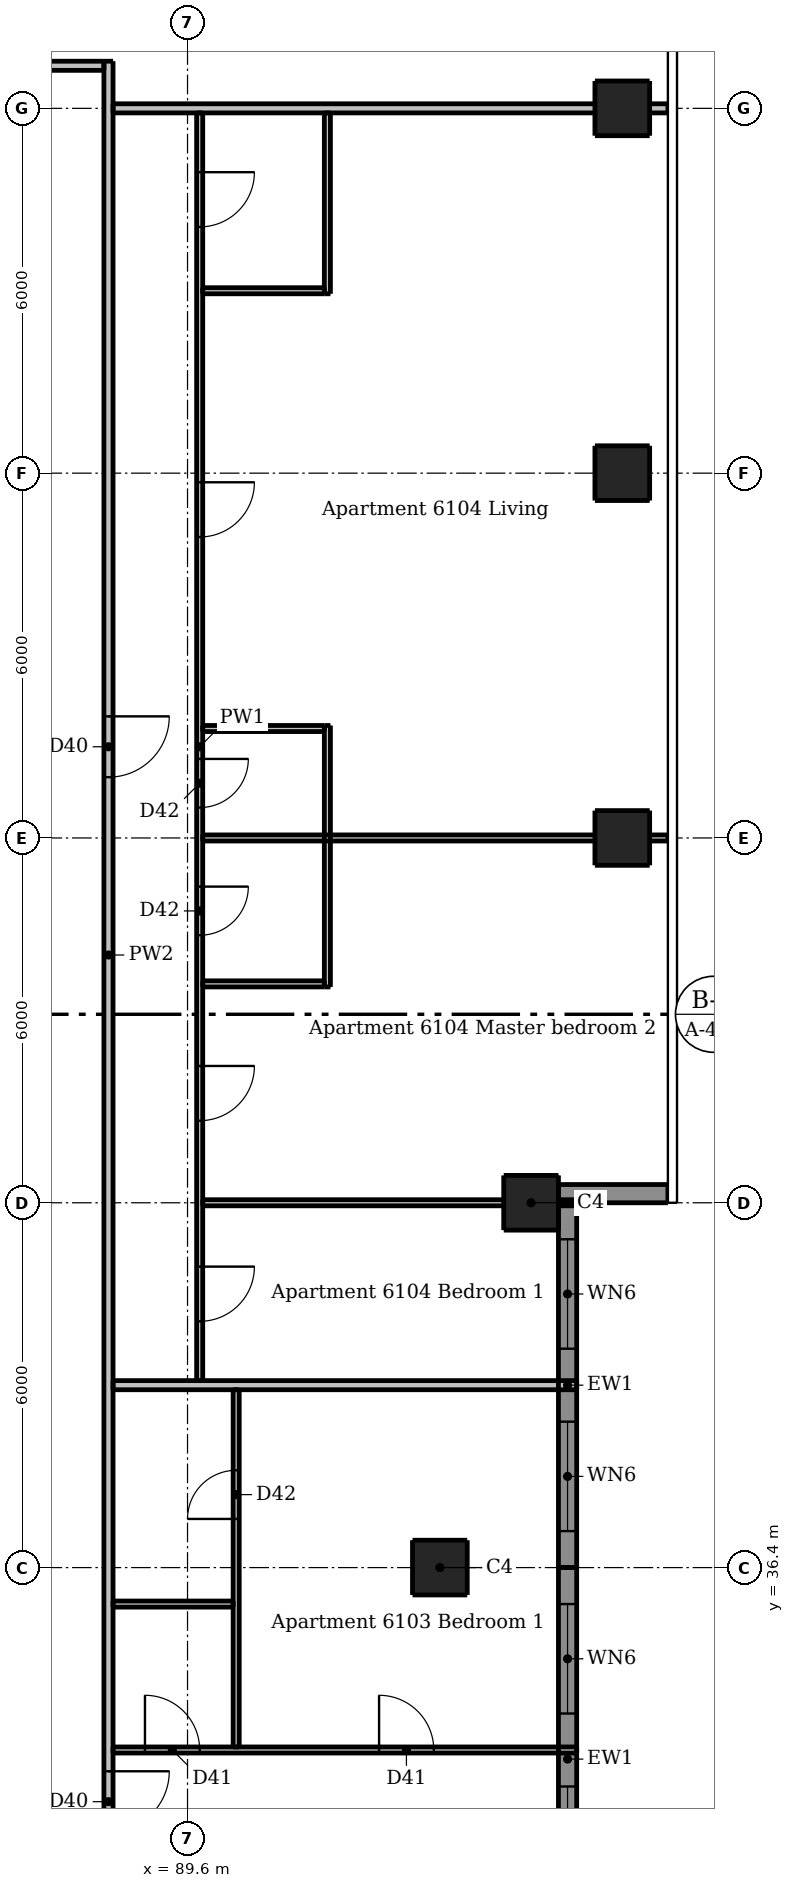
"""IFC4 building model, lengths in metres.
Left out: names, types, materials, properties, quantities, classifications, styles, units other than length and angle.
Written with IfcOpenShell. Run it as: python <this file> out.ifc"""

import sys

from ifc_helpers import new_model, si_unit, direction, frame, frame_2d, origin, origin_2d, place, context, subcontext, project, spatial, rectangle, extrude, element, fill, save


model = new_model("IFC4")
c1 = context("Model", 3, precision=1e-05, world=origin(), true_north=direction((0.0, 1.0)))
c2 = subcontext(c1, "Body", "Model", "MODEL_VIEW")
j1 = project(units=[si_unit("LENGTHUNIT", "METRE"), si_unit("PLANEANGLEUNIT", "RADIAN")], contexts=[c1])
p1 = place(None, origin())
s1 = spatial("IfcSite", under=j1, at=p1, CompositionType="ELEMENT")
p2 = place(p1, origin())
s2 = spatial("IfcBuilding", under=s1, at=p2, CompositionType="ELEMENT")
p3 = place(p2, frame((0.0, 0.0, 226.6)))
s3 = spatial("IfcBuildingStorey", under=s2, at=p3, CompositionType="ELEMENT", Elevation=226.6)
for number, where, z_axis, x_axis in (
    (1, (93.75, 36.4, 0.0), (0.0, 0.0, 1.0), (1.0, 0.0, 0.0)),
    (2, (95.25, 42.4, 0.0), (0.0, 0.0, 1.0), (1.0, 0.0, 0.0)),
    (3, (96.75, 48.4, 0.0), (0.0, 0.0, 1.0), (1.0, 0.0, 0.0)),
    (4, (96.75, 54.4, 0.0), (0.0, 0.0, 1.0), (1.0, 0.0, 0.0)),
    (5, (96.75, 60.4, 0.0), (0.0, 0.0, 1.0), (1.0, 0.0, 0.0)),
):
    element("IfcColumn", number, at=place(p3, frame(where, z_axis=z_axis, x_axis=x_axis)), inside=s3, PredefinedType="COLUMN", context=c2, shape_type="SweptSolid", body=[
        extrude(rectangle(XDim=0.9, YDim=0.9, at=origin_2d()), origin(), (0.0, 0.0, 1.0), 2.95),
    ])
p4 = place(p3, frame((95.7, 42.55, 0.0), z_axis=(0.0, 0.0, 1.0), x_axis=(1.0, 0.0, 0.0)))
e6 = element("IfcWall", 6, at=p4, inside=s3, PredefinedType="SOLIDWALL", context=c2, shape_type="SweptSolid", body=[
    extrude(rectangle(XDim=1.8, YDim=0.3, at=frame_2d((0.9, 0.0))), origin(), (0.0, 0.0, 1.0), 2.95),
])
p5 = place(p3, frame((95.85, 30.1, 0.0), z_axis=(0.0, 0.0, 1.0), x_axis=(0.0, 1.0, 0.0)))
e7 = element("IfcWall", 7, at=p5, inside=s3, PredefinedType="SOLIDWALL", context=c2, shape_type="SweptSolid", body=[
    extrude(rectangle(XDim=6.3, YDim=0.3, at=frame_2d((3.15, 0.0))), origin(), (0.0, 0.0, 1.0), 2.34),
])
p6 = place(p5, frame((0.9, 0.0, 0.15)))
e8 = element("IfcOpeningElement", 8, at=p6, cuts=e7, PredefinedType="OPENING", context=c2, shape_type="SweptSolid", body=[
    extrude(rectangle(XDim=1.8, YDim=2.1, at=frame_2d((0.9, 1.05))), frame((0.0, 0.16, 0.0), z_axis=(0.0, -1.0, 0.0), x_axis=(1.0, 0.0, 0.0)), (0.0, 0.0, 1.0), 0.32),
])
p7 = place(p5, frame((3.9, 0.0, 0.15)))
e9 = element("IfcOpeningElement", 9, at=p7, cuts=e7, PredefinedType="OPENING", context=c2, shape_type="SweptSolid", body=[
    extrude(rectangle(XDim=1.8, YDim=2.1, at=frame_2d((0.9, 1.05))), frame((0.0, 0.16, 0.0), z_axis=(0.0, -1.0, 0.0), x_axis=(1.0, 0.0, 0.0)), (0.0, 0.0, 1.0), 0.32),
])
p8 = place(p3, frame((95.85, 36.4, 0.0), z_axis=(0.0, 0.0, 1.0), x_axis=(0.0, 1.0, 0.0)))
e10 = element("IfcWall", 10, at=p8, inside=s3, PredefinedType="SOLIDWALL", context=c2, shape_type="SweptSolid", body=[
    extrude(rectangle(XDim=6.0, YDim=0.3, at=frame_2d((3.0, 0.0))), origin(), (0.0, 0.0, 1.0), 2.34),
])
p9 = place(p8, frame((0.6, 0.0, 0.15)))
e11 = element("IfcOpeningElement", 11, at=p9, cuts=e10, PredefinedType="OPENING", context=c2, shape_type="SweptSolid", body=[
    extrude(rectangle(XDim=1.8, YDim=2.1, at=frame_2d((0.9, 1.05))), frame((0.0, 0.16, 0.0), z_axis=(0.0, -1.0, 0.0), x_axis=(1.0, 0.0, 0.0)), (0.0, 0.0, 1.0), 0.32),
])
p10 = place(p8, frame((3.6, 0.0, 0.15)))
e12 = element("IfcOpeningElement", 12, at=p10, cuts=e10, PredefinedType="OPENING", context=c2, shape_type="SweptSolid", body=[
    extrude(rectangle(XDim=1.8, YDim=2.1, at=frame_2d((0.9, 1.05))), frame((0.0, 0.16, 0.0), z_axis=(0.0, -1.0, 0.0), x_axis=(1.0, 0.0, 0.0)), (0.0, 0.0, 1.0), 0.32),
])
p11 = place(p3, frame((89.8, 60.325, 0.0), z_axis=(0.0, 0.0, 1.0), x_axis=(0.0, -1.0, 0.0)))
e13 = element("IfcWall", 13, at=p11, inside=s3, PredefinedType="PARTITIONING", context=c2, shape_type="SweptSolid", body=[
    extrude(rectangle(XDim=20.85, YDim=0.1, at=frame_2d((10.425, 0.0))), origin(), (0.0, 0.0, 1.0), 2.95),
])
p12 = place(p11, frame((6.075, 0.0, 0.0)))
e14 = element("IfcOpeningElement", 14, at=p12, cuts=e13, PredefinedType="OPENING", context=c2, shape_type="SweptSolid", body=[
    extrude(rectangle(XDim=0.9, YDim=2.1, at=frame_2d((0.45, 1.05))), frame((0.0, 0.06, 0.0), z_axis=(0.0, -1.0, 0.0), x_axis=(1.0, 0.0, 0.0)), (0.0, 0.0, 1.0), 0.12),
])
p13 = place(p11, frame((0.975, 0.0, 0.0)))
e15 = element("IfcOpeningElement", 15, at=p13, cuts=e13, PredefinedType="OPENING", context=c2, shape_type="SweptSolid", body=[
    extrude(rectangle(XDim=0.9, YDim=2.1, at=frame_2d((0.45, 1.05))), frame((0.0, 0.06, 0.0), z_axis=(0.0, -1.0, 0.0), x_axis=(1.0, 0.0, 0.0)), (0.0, 0.0, 1.0), 0.12),
])
p14 = place(p11, frame((10.625, 0.0, 0.0)))
e16 = element("IfcOpeningElement", 16, at=p14, cuts=e13, PredefinedType="OPENING", context=c2, shape_type="SweptSolid", body=[
    extrude(rectangle(XDim=0.8, YDim=2.1, at=frame_2d((0.4, 1.05))), frame((0.0, 0.06, 0.0), z_axis=(0.0, -1.0, 0.0), x_axis=(1.0, 0.0, 0.0)), (0.0, 0.0, 1.0), 0.12),
])
p15 = place(p11, frame((18.975, 0.0, 0.0)))
e17 = element("IfcOpeningElement", 17, at=p15, cuts=e13, PredefinedType="OPENING", context=c2, shape_type="SweptSolid", body=[
    extrude(rectangle(XDim=0.9, YDim=2.1, at=frame_2d((0.45, 1.05))), frame((0.0, 0.06, 0.0), z_axis=(0.0, -1.0, 0.0), x_axis=(1.0, 0.0, 0.0)), (0.0, 0.0, 1.0), 0.12),
])
p16 = place(p11, frame((15.675, 0.0, 0.0)))
e18 = element("IfcOpeningElement", 18, at=p16, cuts=e13, PredefinedType="OPENING", context=c2, shape_type="SweptSolid", body=[
    extrude(rectangle(XDim=0.9, YDim=2.1, at=frame_2d((0.45, 1.05))), frame((0.0, 0.06, 0.0), z_axis=(0.0, -1.0, 0.0), x_axis=(1.0, 0.0, 0.0)), (0.0, 0.0, 1.0), 0.12),
])
p17 = place(p11, frame((12.725, 0.0, 0.0)))
e19 = element("IfcOpeningElement", 19, at=p17, cuts=e13, PredefinedType="OPENING", context=c2, shape_type="SweptSolid", body=[
    extrude(rectangle(XDim=0.8, YDim=2.1, at=frame_2d((0.4, 1.05))), frame((0.0, 0.06, 0.0), z_axis=(0.0, -1.0, 0.0), x_axis=(1.0, 0.0, 0.0)), (0.0, 0.0, 1.0), 0.12),
])
p18 = place(p3, frame((90.4, 33.45, 0.0), z_axis=(0.0, 0.0, 1.0), x_axis=(0.0, 1.0, 0.0)))
e20 = element("IfcWall", 20, at=p18, inside=s3, PredefinedType="PARTITIONING", context=c2, shape_type="SweptSolid", body=[
    extrude(rectangle(XDim=5.875, YDim=0.1, at=frame_2d((2.938, 0.0))), origin(), (0.0, 0.0, 1.0), 2.95),
])
p19 = place(p18, frame((3.75, 0.0, 0.0)))
e21 = element("IfcOpeningElement", 21, at=p19, cuts=e20, PredefinedType="OPENING", context=c2, shape_type="SweptSolid", body=[
    extrude(rectangle(XDim=0.8, YDim=2.1, at=frame_2d((0.4, 1.05))), frame((0.0, 0.06, 0.0), z_axis=(0.0, -1.0, 0.0), x_axis=(1.0, 0.0, 0.0)), (0.0, 0.0, 1.0), 0.12),
])
p20 = place(p3, frame((91.9, 45.95, 0.0), z_axis=(0.0, 0.0, 1.0), x_axis=(0.0, 1.0, 0.0)))
e22 = element("IfcWall", 22, at=p20, inside=s3, PredefinedType="PARTITIONING", context=c2, shape_type="SweptSolid", body=[
    extrude(rectangle(XDim=4.3, YDim=0.1, at=frame_2d((2.15, 0.0))), origin(), (0.0, 0.0, 1.0), 2.95),
])
p21 = place(p3, frame((91.9, 57.35, 0.0), z_axis=(0.0, 0.0, 1.0), x_axis=(0.0, 1.0, 0.0)))
e23 = element("IfcWall", 23, at=p21, inside=s3, PredefinedType="PARTITIONING", context=c2, shape_type="SweptSolid", body=[
    extrude(rectangle(XDim=2.975, YDim=0.1, at=frame_2d((1.487, 0.0))), origin(), (0.0, 0.0, 1.0), 2.95),
])
for number, where, z_axis, x_axis in (
    (24, (89.85, 57.4, 0.0), (0.0, 0.0, 1.0), (1.0, 0.0, 0.0)),
    (25, (89.85, 50.2, 0.0), (0.0, 0.0, 1.0), (1.0, 0.0, 0.0)),
):
    element("IfcWall", number, at=place(p3, frame(where, z_axis=z_axis, x_axis=x_axis)), inside=s3, PredefinedType="PARTITIONING", context=c2, shape_type="SweptSolid", body=[
        extrude(rectangle(XDim=2.0, YDim=0.1, at=frame_2d((1.0, 0.0))), origin(), (0.0, 0.0, 1.0), 2.95),
    ])
p22 = place(p3, frame((89.85, 48.4, 0.0), z_axis=(0.0, 0.0, 1.0), x_axis=(1.0, 0.0, 0.0)))
e26 = element("IfcWall", 26, at=p22, inside=s3, PredefinedType="PARTITIONING", context=c2, shape_type="SweptSolid", body=[
    extrude(rectangle(XDim=7.65, YDim=0.1, at=frame_2d((3.825, 0.0))), origin(), (0.0, 0.0, 1.0), 2.332),
])
p23 = place(p3, frame((89.85, 46.0, 0.0), z_axis=(0.0, 0.0, 1.0), x_axis=(1.0, 0.0, 0.0)))
e27 = element("IfcWall", 27, at=p23, inside=s3, PredefinedType="PARTITIONING", context=c2, shape_type="SweptSolid", body=[
    extrude(rectangle(XDim=2.0, YDim=0.1, at=frame_2d((1.0, 0.0))), origin(), (0.0, 0.0, 1.0), 2.95),
])
p24 = place(p3, frame((89.85, 42.4, 0.0), z_axis=(0.0, 0.0, 1.0), x_axis=(1.0, 0.0, 0.0)))
e28 = element("IfcWall", 28, at=p24, inside=s3, PredefinedType="PARTITIONING", context=c2, shape_type="SweptSolid", body=[
    extrude(rectangle(XDim=6.15, YDim=0.1, at=frame_2d((3.075, 0.0))), origin(), (0.0, 0.0, 1.0), 2.332),
])
p25 = place(p3, frame((88.375, 35.8, 0.0), z_axis=(0.0, 0.0, 1.0), x_axis=(1.0, 0.0, 0.0)))
e29 = element("IfcWall", 29, at=p25, inside=s3, PredefinedType="PARTITIONING", context=c2, shape_type="SweptSolid", body=[
    extrude(rectangle(XDim=1.975, YDim=0.1, at=frame_2d((0.988, 0.0))), origin(), (0.0, 0.0, 1.0), 2.95),
])
p26 = place(p3, frame((88.375, 33.4, 0.0), z_axis=(0.0, 0.0, 1.0), x_axis=(1.0, 0.0, 0.0)))
e30 = element("IfcWall", 30, at=p26, inside=s3, PredefinedType="PARTITIONING", context=c2, shape_type="SweptSolid", body=[
    extrude(rectangle(XDim=7.625, YDim=0.1, at=frame_2d((3.812, 0.0))), origin(), (0.0, 0.0, 1.0), 2.95),
])
p27 = place(p26, frame((0.525, 0.0, 0.0)))
e31 = element("IfcOpeningElement", 31, at=p27, cuts=e30, PredefinedType="OPENING", context=c2, shape_type="SweptSolid", body=[
    extrude(rectangle(XDim=0.9, YDim=2.1, at=frame_2d((0.45, 1.05))), frame((0.0, 0.06, 0.0), z_axis=(0.0, -1.0, 0.0), x_axis=(1.0, 0.0, 0.0)), (0.0, 0.0, 1.0), 0.12),
])
p28 = place(p26, frame((4.375, 0.0, 0.0)))
e32 = element("IfcOpeningElement", 32, at=p28, cuts=e30, PredefinedType="OPENING", context=c2, shape_type="SweptSolid", body=[
    extrude(rectangle(XDim=0.9, YDim=2.1, at=frame_2d((0.45, 1.05))), frame((0.0, 0.06, 0.0), z_axis=(0.0, -1.0, 0.0), x_axis=(1.0, 0.0, 0.0)), (0.0, 0.0, 1.0), 0.12),
])
p29 = place(p3, frame((88.3, 61.175, 0.0), z_axis=(0.0, 0.0, 1.0), x_axis=(0.0, -1.0, 0.0)))
e33 = element("IfcWall", 33, at=p29, inside=s3, PredefinedType="PARTITIONING", context=c2, shape_type="SweptSolid", body=[
    extrude(rectangle(XDim=29.4, YDim=0.15, at=frame_2d((14.7, 0.0))), origin(), (0.0, 0.0, 1.0), 2.95),
])
p30 = place(p29, frame((28.125, 0.0, 0.0)))
e34 = element("IfcOpeningElement", 34, at=p30, cuts=e33, PredefinedType="OPENING", context=c2, shape_type="SweptSolid", body=[
    extrude(rectangle(XDim=1.0, YDim=2.1, at=frame_2d((0.5, 1.05))), frame((0.0, 0.085, 0.0), z_axis=(0.0, -1.0, 0.0), x_axis=(1.0, 0.0, 0.0)), (0.0, 0.0, 1.0), 0.17),
])
p31 = place(p29, frame((10.775, 0.0, 0.0)))
e35 = element("IfcOpeningElement", 35, at=p31, cuts=e33, PredefinedType="OPENING", context=c2, shape_type="SweptSolid", body=[
    extrude(rectangle(XDim=1.0, YDim=2.1, at=frame_2d((0.5, 1.05))), frame((0.0, 0.085, 0.0), z_axis=(0.0, -1.0, 0.0), x_axis=(1.0, 0.0, 0.0)), (0.0, 0.0, 1.0), 0.17),
])
p32 = place(p3, frame((58.975, 61.1, 0.0), z_axis=(0.0, 0.0, 1.0), x_axis=(1.0, 0.0, 0.0)))
e36 = element("IfcWall", 36, at=p32, inside=s3, PredefinedType="PARTITIONING", context=c2, shape_type="SweptSolid", body=[
    extrude(rectangle(XDim=29.25, YDim=0.15, at=frame_2d((14.625, 0.0))), origin(), (0.0, 0.0, 1.0), 2.95),
])
p33 = place(p32, frame((9.125, 0.0, 0.0)))
e37 = element("IfcOpeningElement", 37, at=p33, cuts=e36, PredefinedType="OPENING", context=c2, shape_type="SweptSolid", body=[
    extrude(rectangle(XDim=1.0, YDim=2.1, at=frame_2d((0.5, 1.05))), frame((0.0, 0.085, 0.0), z_axis=(0.0, -1.0, 0.0), x_axis=(1.0, 0.0, 0.0)), (0.0, 0.0, 1.0), 0.17),
])
p34 = place(p32, frame((26.475, 0.0, 0.0)))
e38 = element("IfcOpeningElement", 38, at=p34, cuts=e36, PredefinedType="OPENING", context=c2, shape_type="SweptSolid", body=[
    extrude(rectangle(XDim=1.0, YDim=2.1, at=frame_2d((0.5, 1.05))), frame((0.0, 0.085, 0.0), z_axis=(0.0, -1.0, 0.0), x_axis=(1.0, 0.0, 0.0)), (0.0, 0.0, 1.0), 0.17),
])
p35 = place(p3, frame((88.375, 60.4, 0.0), z_axis=(0.0, 0.0, 1.0), x_axis=(1.0, 0.0, 0.0)))
e39 = element("IfcWall", 39, at=p35, inside=s3, PredefinedType="PARTITIONING", context=c2, shape_type="SweptSolid", body=[
    extrude(rectangle(XDim=9.125, YDim=0.15, at=frame_2d((4.562, 0.0))), origin(), (0.0, 0.0, 1.0), 2.332),
])
p36 = place(p3, frame((88.375, 39.4, 0.0), z_axis=(0.0, 0.0, 1.0), x_axis=(1.0, 0.0, 0.0)))
e40 = element("IfcWall", 40, at=p36, inside=s3, PredefinedType="PARTITIONING", context=c2, shape_type="SweptSolid", body=[
    extrude(rectangle(XDim=7.625, YDim=0.15, at=frame_2d((3.812, 0.0))), origin(), (0.0, 0.0, 1.0), 2.95),
])
p37 = place(p6, origin())
e41 = element("IfcWindow", 41, at=p37, inside=s3, PartitioningType="DOUBLE_PANEL_VERTICAL", PredefinedType="WINDOW", context=c2, shape_type="SweptSolid", body=[
    extrude(rectangle(XDim=1.8, YDim=2.1, at=frame_2d((0.9, 1.05))), frame((0.0, 0.03, 0.0), z_axis=(0.0, -1.0, 0.0), x_axis=(1.0, 0.0, 0.0)), (0.0, 0.0, 1.0), 0.06),
])
fill(e8, e41)
p38 = place(p7, origin())
e42 = element("IfcWindow", 42, at=p38, inside=s3, PartitioningType="DOUBLE_PANEL_VERTICAL", PredefinedType="WINDOW", context=c2, shape_type="SweptSolid", body=[
    extrude(rectangle(XDim=1.8, YDim=2.1, at=frame_2d((0.9, 1.05))), frame((0.0, 0.03, 0.0), z_axis=(0.0, -1.0, 0.0), x_axis=(1.0, 0.0, 0.0)), (0.0, 0.0, 1.0), 0.06),
])
fill(e9, e42)
p39 = place(p9, origin())
e43 = element("IfcWindow", 43, at=p39, inside=s3, PartitioningType="DOUBLE_PANEL_VERTICAL", PredefinedType="WINDOW", context=c2, shape_type="SweptSolid", body=[
    extrude(rectangle(XDim=1.8, YDim=2.1, at=frame_2d((0.9, 1.05))), frame((0.0, 0.03, 0.0), z_axis=(0.0, -1.0, 0.0), x_axis=(1.0, 0.0, 0.0)), (0.0, 0.0, 1.0), 0.06),
])
fill(e11, e43)
p40 = place(p10, origin())
e44 = element("IfcWindow", 44, at=p40, inside=s3, PartitioningType="DOUBLE_PANEL_VERTICAL", PredefinedType="WINDOW", context=c2, shape_type="SweptSolid", body=[
    extrude(rectangle(XDim=1.8, YDim=2.1, at=frame_2d((0.9, 1.05))), frame((0.0, 0.03, 0.0), z_axis=(0.0, -1.0, 0.0), x_axis=(1.0, 0.0, 0.0)), (0.0, 0.0, 1.0), 0.06),
])
fill(e12, e44)
p41 = place(p30, origin())
e45 = element("IfcDoor", 45, at=p41, inside=s3, OperationType="SINGLE_SWING_LEFT", PredefinedType="DOOR", context=c2, shape_type="SweptSolid", body=[
    extrude(rectangle(XDim=1.0, YDim=2.1, at=frame_2d((0.5, 1.05))), frame((0.0, 0.025, 0.0), z_axis=(0.0, -1.0, 0.0), x_axis=(1.0, 0.0, 0.0)), (0.0, 0.0, 1.0), 0.05),
])
fill(e34, e45)
p42 = place(p27, origin())
e46 = element("IfcDoor", 46, at=p42, inside=s3, OperationType="SINGLE_SWING_LEFT", PredefinedType="DOOR", context=c2, shape_type="SweptSolid", body=[
    extrude(rectangle(XDim=0.9, YDim=2.1, at=frame_2d((0.45, 1.05))), frame((0.0, 0.025, 0.0), z_axis=(0.0, -1.0, 0.0), x_axis=(1.0, 0.0, 0.0)), (0.0, 0.0, 1.0), 0.05),
])
fill(e31, e46)
p43 = place(p28, origin())
e47 = element("IfcDoor", 47, at=p43, inside=s3, OperationType="SINGLE_SWING_LEFT", PredefinedType="DOOR", context=c2, shape_type="SweptSolid", body=[
    extrude(rectangle(XDim=0.9, YDim=2.1, at=frame_2d((0.45, 1.05))), frame((0.0, 0.025, 0.0), z_axis=(0.0, -1.0, 0.0), x_axis=(1.0, 0.0, 0.0)), (0.0, 0.0, 1.0), 0.05),
])
fill(e32, e47)
p44 = place(p19, origin())
e48 = element("IfcDoor", 48, at=p44, inside=s3, OperationType="SINGLE_SWING_LEFT", PredefinedType="DOOR", context=c2, shape_type="SweptSolid", body=[
    extrude(rectangle(XDim=0.8, YDim=2.1, at=frame_2d((0.4, 1.05))), frame((0.0, 0.025, 0.0), z_axis=(0.0, -1.0, 0.0), x_axis=(1.0, 0.0, 0.0)), (0.0, 0.0, 1.0), 0.05),
])
fill(e21, e48)
p45 = place(p31, origin())
e49 = element("IfcDoor", 49, at=p45, inside=s3, OperationType="SINGLE_SWING_LEFT", PredefinedType="DOOR", context=c2, shape_type="SweptSolid", body=[
    extrude(rectangle(XDim=1.0, YDim=2.1, at=frame_2d((0.5, 1.05))), frame((0.0, 0.025, 0.0), z_axis=(0.0, -1.0, 0.0), x_axis=(1.0, 0.0, 0.0)), (0.0, 0.0, 1.0), 0.05),
])
fill(e35, e49)
p46 = place(p12, origin())
e50 = element("IfcDoor", 50, at=p46, inside=s3, OperationType="SINGLE_SWING_LEFT", PredefinedType="DOOR", context=c2, shape_type="SweptSolid", body=[
    extrude(rectangle(XDim=0.9, YDim=2.1, at=frame_2d((0.45, 1.05))), frame((0.0, 0.025, 0.0), z_axis=(0.0, -1.0, 0.0), x_axis=(1.0, 0.0, 0.0)), (0.0, 0.0, 1.0), 0.05),
])
fill(e14, e50)
p47 = place(p13, origin())
e51 = element("IfcDoor", 51, at=p47, inside=s3, OperationType="SINGLE_SWING_LEFT", PredefinedType="DOOR", context=c2, shape_type="SweptSolid", body=[
    extrude(rectangle(XDim=0.9, YDim=2.1, at=frame_2d((0.45, 1.05))), frame((0.0, 0.025, 0.0), z_axis=(0.0, -1.0, 0.0), x_axis=(1.0, 0.0, 0.0)), (0.0, 0.0, 1.0), 0.05),
])
fill(e15, e51)
p48 = place(p14, origin())
e52 = element("IfcDoor", 52, at=p48, inside=s3, OperationType="SINGLE_SWING_LEFT", PredefinedType="DOOR", context=c2, shape_type="SweptSolid", body=[
    extrude(rectangle(XDim=0.8, YDim=2.1, at=frame_2d((0.4, 1.05))), frame((0.0, 0.025, 0.0), z_axis=(0.0, -1.0, 0.0), x_axis=(1.0, 0.0, 0.0)), (0.0, 0.0, 1.0), 0.05),
])
fill(e16, e52)
p49 = place(p15, origin())
e53 = element("IfcDoor", 53, at=p49, inside=s3, OperationType="SINGLE_SWING_LEFT", PredefinedType="DOOR", context=c2, shape_type="SweptSolid", body=[
    extrude(rectangle(XDim=0.9, YDim=2.1, at=frame_2d((0.45, 1.05))), frame((0.0, 0.025, 0.0), z_axis=(0.0, -1.0, 0.0), x_axis=(1.0, 0.0, 0.0)), (0.0, 0.0, 1.0), 0.05),
])
fill(e17, e53)
p50 = place(p16, origin())
e54 = element("IfcDoor", 54, at=p50, inside=s3, OperationType="SINGLE_SWING_LEFT", PredefinedType="DOOR", context=c2, shape_type="SweptSolid", body=[
    extrude(rectangle(XDim=0.9, YDim=2.1, at=frame_2d((0.45, 1.05))), frame((0.0, 0.025, 0.0), z_axis=(0.0, -1.0, 0.0), x_axis=(1.0, 0.0, 0.0)), (0.0, 0.0, 1.0), 0.05),
])
fill(e18, e54)
p51 = place(p17, origin())
e55 = element("IfcDoor", 55, at=p51, inside=s3, OperationType="SINGLE_SWING_LEFT", PredefinedType="DOOR", context=c2, shape_type="SweptSolid", body=[
    extrude(rectangle(XDim=0.8, YDim=2.1, at=frame_2d((0.4, 1.05))), frame((0.0, 0.025, 0.0), z_axis=(0.0, -1.0, 0.0), x_axis=(1.0, 0.0, 0.0)), (0.0, 0.0, 1.0), 0.05),
])
fill(e19, e55)
save(model, sys.argv[1])
